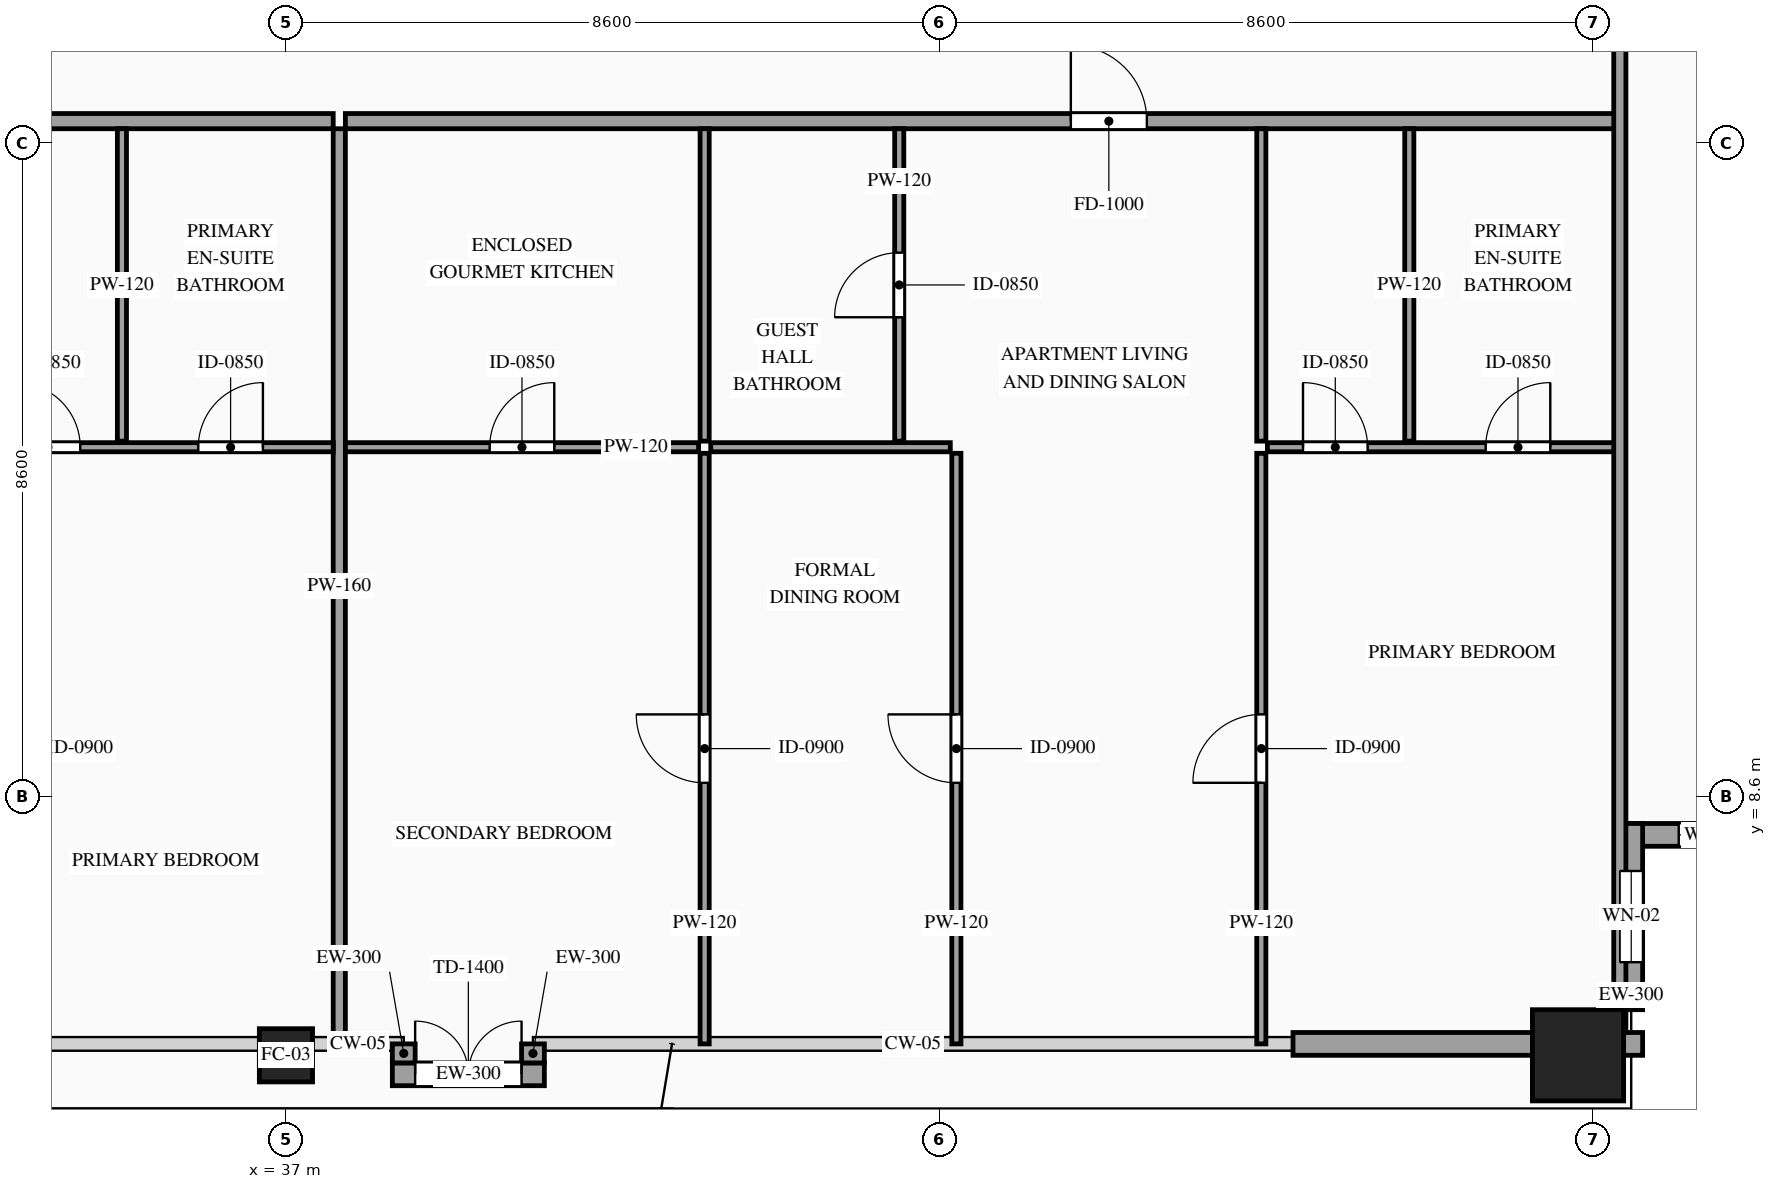
"""IFC4 building model, lengths in metres.
Left out: names, types, materials, properties, quantities, classifications, styles, units other than length and angle.
Written with IfcOpenShell. Run it as: python <this file> out.ifc"""

import sys

from ifc_helpers import new_model, si_unit, direction, frame, frame_2d, origin, origin_2d, place, context, subcontext, project, spatial, rectangle, hollow_rectangle, extrude, source, transform, mapped, element, fill, save


model = new_model("IFC4")
c1 = context("Model", 3, precision=1e-05, world=origin(), true_north=direction((0.0, 1.0)))
c2 = subcontext(c1, "Body", "Model", "MODEL_VIEW")
j1 = project(units=[si_unit("LENGTHUNIT", "METRE"), si_unit("PLANEANGLEUNIT", "RADIAN")], contexts=[c1])
p1 = place(None, origin())
s1 = spatial("IfcSite", under=j1, at=p1, CompositionType="ELEMENT")
p2 = place(p1, origin())
s2 = spatial("IfcBuilding", under=s1, at=p2, CompositionType="ELEMENT")
p3 = place(p2, frame((0.0, 0.0, 227.6)))
s3 = spatial("IfcBuildingStorey", under=s2, at=p3, CompositionType="ELEMENT", Elevation=227.6)
m1 = source(origin(), c2, "Body", "SweptSolid", [
    extrude(hollow_rectangle(XDim=0.7, YDim=0.7, WallThickness=0.032, at=origin_2d()), origin(), (0.0, 0.0, 1.0), 3.5),
])
p4 = place(p3, frame((37.0, 5.2, 0.0), z_axis=(0.0, 0.0, 1.0), x_axis=(1.0, 0.0, 0.0)))
e1 = element("IfcColumn", 1, at=p4, inside=s3, PredefinedType="COLUMN", context=c2, shape_type="MappedRepresentation", body=[
    mapped(m1, transform((0.0, 0.0, 0.0), scale=1.0)),
])
m2 = source(origin(), c2, "Body", "SweptSolid", [
    extrude(hollow_rectangle(XDim=1.2, YDim=1.2, WallThickness=0.055, at=origin_2d()), origin(), (0.0, 0.0, 1.0), 3.5),
])
p5 = place(p3, frame((54.0, 5.2, 0.0), z_axis=(0.0, 0.0, 1.0), x_axis=(1.0, 0.0, 0.0)))
e2 = element("IfcColumn", 2, at=p5, inside=s3, PredefinedType="COLUMN", context=c2, shape_type="MappedRepresentation", body=[
    mapped(m2, transform((0.0, 0.0, 0.0), scale=1.0)),
])
p6 = place(p3, frame((54.55, 8.1, 0.0), z_axis=(0.0, 0.0, 1.0), x_axis=(1.0, 0.0, 0.0)))
e3 = element("IfcWall", 3, at=p6, inside=s3, PredefinedType="SOLIDWALL", context=c2, shape_type="SweptSolid", body=[
    extrude(rectangle(XDim=2.45, YDim=0.3, at=frame_2d((1.225, 0.0))), origin(), (0.0, 0.0, 1.0), 3.28),
])
p7 = place(p6, frame((0.775, 0.0, 0.85)))
e4 = element("IfcOpeningElement", 4, at=p7, cuts=e3, PredefinedType="OPENING", context=c2, shape_type="SweptSolid", body=[
    extrude(rectangle(XDim=0.9, YDim=1.5, at=frame_2d((0.45, 0.75))), frame((0.0, 0.165, 0.0), z_axis=(0.0, -1.0, 0.0), x_axis=(1.0, 0.0, 0.0)), (0.0, 0.0, 1.0), 0.33),
])
p8 = place(p3, frame((54.7, 5.8, 0.0), z_axis=(0.0, 0.0, 1.0), x_axis=(0.0, 1.0, 0.0)))
e5 = element("IfcWall", 5, at=p8, inside=s3, PredefinedType="SOLIDWALL", context=c2, shape_type="SweptSolid", body=[
    extrude(rectangle(XDim=2.45, YDim=0.3, at=frame_2d((1.225, 0.0))), origin(), (0.0, 0.0, 1.0), 3.28),
])
p9 = place(p8, frame((0.625, 0.0, 0.85)))
e6 = element("IfcOpeningElement", 6, at=p9, cuts=e5, PredefinedType="OPENING", context=c2, shape_type="SweptSolid", body=[
    extrude(rectangle(XDim=1.2, YDim=2.1, at=frame_2d((0.6, 1.05))), frame((0.0, 0.165, 0.0), z_axis=(0.0, -1.0, 0.0), x_axis=(1.0, 0.0, 0.0)), (0.0, 0.0, 1.0), 0.33),
])
m3 = source(origin(), c2, "Body", "SweptSolid", [
    extrude(rectangle(XDim=0.25, YDim=0.3, at=frame_2d((0.125, 0.0))), origin(), (0.0, 0.0, 1.0), 3.28),
])
p10 = place(p3, frame((54.6, 5.35, 0.0), z_axis=(0.0, 0.0, 1.0), x_axis=(1.0, 0.0, 0.0)))
e7 = element("IfcWall", 7, at=p10, inside=s3, PredefinedType="SOLIDWALL", context=c2, shape_type="MappedRepresentation", body=[
    mapped(m3, transform((0.0, 0.0, 0.0), scale=1.0)),
])
m4 = source(origin(), c2, "Body", "SweptSolid", [
    extrude(rectangle(XDim=3.15, YDim=0.3, at=frame_2d((1.575, 0.0))), origin(), (0.0, 0.0, 1.0), 2.835),
])
p11 = place(p3, frame((50.25, 5.35, 0.0), z_axis=(0.0, 0.0, 1.0), x_axis=(1.0, 0.0, 0.0)))
e8 = element("IfcWall", 8, at=p11, inside=s3, PredefinedType="SOLIDWALL", context=c2, shape_type="MappedRepresentation", body=[
    mapped(m4, transform((0.0, 0.0, 0.0), scale=1.0)),
])
p12 = place(p3, frame((38.4, 4.95, 0.0), z_axis=(0.0, 0.0, 1.0), x_axis=(1.0, 0.0, 0.0)))
e9 = element("IfcWall", 9, at=p12, inside=s3, PredefinedType="SOLIDWALL", context=c2, shape_type="SweptSolid", body=[
    extrude(rectangle(XDim=2.0, YDim=0.3, at=frame_2d((1.0, 0.0))), origin(), (0.0, 0.0, 1.0), 2.835),
])
p13 = place(p12, frame((0.3, 0.0, 0.0)))
e10 = element("IfcOpeningElement", 10, at=p13, cuts=e9, PredefinedType="OPENING", context=c2, shape_type="SweptSolid", body=[
    extrude(rectangle(XDim=1.4, YDim=2.3, at=frame_2d((0.7, 1.15))), frame((0.0, 0.165, 0.0), z_axis=(0.0, -1.0, 0.0), x_axis=(1.0, 0.0, 0.0)), (0.0, 0.0, 1.0), 0.33),
])
for number, where, z_axis, x_axis in (
    (11, (38.55, 5.35, 0.0), (0.0, 0.0, 1.0), (0.0, -1.0, 0.0)),
    (12, (40.25, 5.1, 0.0), (0.0, 0.0, 1.0), (0.0, 1.0, 0.0)),
):
    element("IfcWall", number, at=place(p3, frame(where, z_axis=z_axis, x_axis=x_axis)), inside=s3, PredefinedType="SOLIDWALL", context=c2, shape_type="MappedRepresentation", body=[
        mapped(m3, transform((0.0, 0.0, 0.0), scale=1.0)),
    ])
p14 = place(p3, frame((19.44, 17.49, 0.0), z_axis=(0.0, 0.0, 1.0), x_axis=(1.0, 0.0, 0.0)))
e13 = element("IfcWall", 13, at=p14, inside=s3, PredefinedType="PARTITIONING", context=c2, shape_type="SweptSolid", body=[
    extrude(rectangle(XDim=18.182, YDim=0.2, at=frame_2d((9.091, 0.0))), origin(), (0.0, 0.0, 1.0), 3.28),
])
p15 = place(p14, frame((10.528, 0.0, 0.0)))
e14 = element("IfcOpeningElement", 14, at=p15, cuts=e13, PredefinedType="OPENING", context=c2, shape_type="SweptSolid", body=[
    extrude(rectangle(XDim=1.0, YDim=2.2, at=frame_2d((0.5, 1.1))), frame((0.0, 0.115, 0.0), z_axis=(0.0, -1.0, 0.0), x_axis=(1.0, 0.0, 0.0)), (0.0, 0.0, 1.0), 0.23),
])
m5 = source(origin(), c2, "Body", "SweptSolid", [
    extrude(rectangle(XDim=12.04, YDim=0.16, at=frame_2d((6.02, 0.0))), origin(), (0.0, 0.0, 1.0), 3.28),
])
p16 = place(p3, frame((37.702, 5.35, 0.0), z_axis=(0.0, 0.0, 1.0), x_axis=(0.0, 1.0, 0.0)))
e15 = element("IfcWall", 15, at=p16, inside=s3, PredefinedType="PARTITIONING", context=c2, shape_type="MappedRepresentation", body=[
    mapped(m5, transform((0.0, 0.0, 0.0), scale=1.0)),
])
m6 = source(origin(), c2, "Body", "SweptSolid", [
    extrude(rectangle(XDim=4.11, YDim=0.12, at=frame_2d((2.055, 0.0))), origin(), (0.0, 0.0, 1.0), 3.28),
])
p17 = place(p3, frame((34.842, 13.28, 0.0), z_axis=(0.0, 0.0, 1.0), x_axis=(0.0, 1.0, 0.0)))
e16 = element("IfcWall", 16, at=p17, inside=s3, PredefinedType="PARTITIONING", context=c2, shape_type="MappedRepresentation", body=[
    mapped(m6, transform((0.0, 0.0, 0.0), scale=1.0)),
])
p18 = place(p3, frame((32.975, 13.2, 0.0), z_axis=(0.0, 0.0, 1.0), x_axis=(1.0, 0.0, 0.0)))
e17 = element("IfcWall", 17, at=p18, inside=s3, PredefinedType="PARTITIONING", context=c2, shape_type="SweptSolid", body=[
    extrude(rectangle(XDim=4.647, YDim=0.12, at=frame_2d((2.323, 0.0))), origin(), (0.0, 0.0, 1.0), 3.28),
])
p19 = place(p18, frame((2.872, 0.0, 0.0)))
e18 = element("IfcOpeningElement", 18, at=p19, cuts=e17, PredefinedType="OPENING", context=c2, shape_type="SweptSolid", body=[
    extrude(rectangle(XDim=0.85, YDim=2.1, at=frame_2d((0.425, 1.05))), frame((0.0, 0.075, 0.0), z_axis=(0.0, -1.0, 0.0), x_axis=(1.0, 0.0, 0.0)), (0.0, 0.0, 1.0), 0.15),
])
p20 = place(p18, frame((0.469, 0.0, 0.0)))
e19 = element("IfcOpeningElement", 19, at=p20, cuts=e17, PredefinedType="OPENING", context=c2, shape_type="SweptSolid", body=[
    extrude(rectangle(XDim=0.85, YDim=2.1, at=frame_2d((0.425, 1.05))), frame((0.0, 0.075, 0.0), z_axis=(0.0, -1.0, 0.0), x_axis=(1.0, 0.0, 0.0)), (0.0, 0.0, 1.0), 0.15),
])
p21 = place(p3, frame((37.782, 17.49, 0.0), z_axis=(0.0, 0.0, 1.0), x_axis=(1.0, 0.0, 0.0)))
e20 = element("IfcWall", 20, at=p21, inside=s3, PredefinedType="PARTITIONING", context=c2, shape_type="SweptSolid", body=[
    extrude(rectangle(XDim=16.778, YDim=0.2, at=frame_2d((8.389, 0.0))), origin(), (0.0, 0.0, 1.0), 3.28),
])
p22 = place(p21, frame((9.545, 0.0, 0.0)))
e21 = element("IfcOpeningElement", 21, at=p22, cuts=e20, PredefinedType="OPENING", context=c2, shape_type="SweptSolid", body=[
    extrude(rectangle(XDim=1.0, YDim=2.2, at=frame_2d((0.5, 1.1))), frame((0.0, 0.115, 0.0), z_axis=(0.0, -1.0, 0.0), x_axis=(1.0, 0.0, 0.0)), (0.0, 0.0, 1.0), 0.23),
])
p23 = place(p3, frame((37.782, 13.2, 0.0), z_axis=(0.0, 0.0, 1.0), x_axis=(1.0, 0.0, 0.0)))
e22 = element("IfcWall", 22, at=p23, inside=s3, PredefinedType="PARTITIONING", context=c2, shape_type="SweptSolid", body=[
    extrude(rectangle(XDim=4.647, YDim=0.12, at=frame_2d((2.323, 0.0))), origin(), (0.0, 0.0, 1.0), 3.28),
])
p24 = place(p23, frame((1.898, 0.0, 0.0)))
e23 = element("IfcOpeningElement", 23, at=p24, cuts=e22, PredefinedType="OPENING", context=c2, shape_type="SweptSolid", body=[
    extrude(rectangle(XDim=0.85, YDim=2.1, at=frame_2d((0.425, 1.05))), frame((0.0, 0.075, 0.0), z_axis=(0.0, -1.0, 0.0), x_axis=(1.0, 0.0, 0.0)), (0.0, 0.0, 1.0), 0.15),
])
p25 = place(p3, frame((42.509, 13.28, 0.0), z_axis=(0.0, 0.0, 1.0), x_axis=(0.0, 1.0, 0.0)))
e24 = element("IfcWall", 24, at=p25, inside=s3, PredefinedType="PARTITIONING", context=c2, shape_type="MappedRepresentation", body=[
    mapped(m6, transform((0.0, 0.0, 0.0), scale=1.0)),
])
p26 = place(p3, frame((45.069, 13.28, 0.0), z_axis=(0.0, 0.0, 1.0), x_axis=(0.0, 1.0, 0.0)))
e25 = element("IfcWall", 25, at=p26, inside=s3, PredefinedType="PARTITIONING", context=c2, shape_type="SweptSolid", body=[
    extrude(rectangle(XDim=4.11, YDim=0.12, at=frame_2d((2.055, 0.0))), origin(), (0.0, 0.0, 1.0), 3.28),
])
p27 = place(p26, frame((1.63, 0.0, 0.0)))
e26 = element("IfcOpeningElement", 26, at=p27, cuts=e25, PredefinedType="OPENING", context=c2, shape_type="SweptSolid", body=[
    extrude(rectangle(XDim=0.85, YDim=2.1, at=frame_2d((0.425, 1.05))), frame((0.0, 0.075, 0.0), z_axis=(0.0, -1.0, 0.0), x_axis=(1.0, 0.0, 0.0)), (0.0, 0.0, 1.0), 0.15),
])
for number, where, z_axis, x_axis in (
    (27, (51.78, 13.28, 0.0), (0.0, 0.0, 1.0), (0.0, 1.0, 0.0)),
    (28, (49.833, 13.28, 0.0), (0.0, 0.0, 1.0), (0.0, 1.0, 0.0)),
):
    element("IfcWall", number, at=place(p3, frame(where, z_axis=z_axis, x_axis=x_axis)), inside=s3, PredefinedType="PARTITIONING", context=c2, shape_type="MappedRepresentation", body=[
        mapped(m6, transform((0.0, 0.0, 0.0), scale=1.0)),
    ])
p28 = place(p3, frame((42.509, 5.35, 0.0), z_axis=(0.0, 0.0, 1.0), x_axis=(0.0, 1.0, 0.0)))
e29 = element("IfcWall", 29, at=p28, inside=s3, PredefinedType="PARTITIONING", context=c2, shape_type="SweptSolid", body=[
    extrude(rectangle(XDim=7.77, YDim=0.12, at=frame_2d((3.885, 0.0))), origin(), (0.0, 0.0, 1.0), 3.28),
])
p29 = place(p28, frame((3.435, 0.0, 0.0)))
e30 = element("IfcOpeningElement", 30, at=p29, cuts=e29, PredefinedType="OPENING", context=c2, shape_type="SweptSolid", body=[
    extrude(rectangle(XDim=0.9, YDim=2.15, at=frame_2d((0.45, 1.075))), frame((0.0, 0.075, 0.0), z_axis=(0.0, -1.0, 0.0), x_axis=(1.0, 0.0, 0.0)), (0.0, 0.0, 1.0), 0.15),
])
p30 = place(p3, frame((49.913, 13.2, 0.0), z_axis=(0.0, 0.0, 1.0), x_axis=(1.0, 0.0, 0.0)))
e31 = element("IfcWall", 31, at=p30, inside=s3, PredefinedType="PARTITIONING", context=c2, shape_type="SweptSolid", body=[
    extrude(rectangle(XDim=4.647, YDim=0.12, at=frame_2d((2.323, 0.0))), origin(), (0.0, 0.0, 1.0), 3.28),
])
p31 = place(p30, frame((2.872, 0.0, 0.0)))
e32 = element("IfcOpeningElement", 32, at=p31, cuts=e31, PredefinedType="OPENING", context=c2, shape_type="SweptSolid", body=[
    extrude(rectangle(XDim=0.85, YDim=2.1, at=frame_2d((0.425, 1.05))), frame((0.0, 0.075, 0.0), z_axis=(0.0, -1.0, 0.0), x_axis=(1.0, 0.0, 0.0)), (0.0, 0.0, 1.0), 0.15),
])
p32 = place(p30, frame((0.469, 0.0, 0.0)))
e33 = element("IfcOpeningElement", 33, at=p32, cuts=e31, PredefinedType="OPENING", context=c2, shape_type="SweptSolid", body=[
    extrude(rectangle(XDim=0.85, YDim=2.1, at=frame_2d((0.425, 1.05))), frame((0.0, 0.075, 0.0), z_axis=(0.0, -1.0, 0.0), x_axis=(1.0, 0.0, 0.0)), (0.0, 0.0, 1.0), 0.15),
])
p33 = place(p3, frame((49.833, 5.35, 0.0), z_axis=(0.0, 0.0, 1.0), x_axis=(0.0, 1.0, 0.0)))
e34 = element("IfcWall", 34, at=p33, inside=s3, PredefinedType="PARTITIONING", context=c2, shape_type="SweptSolid", body=[
    extrude(rectangle(XDim=7.77, YDim=0.12, at=frame_2d((3.885, 0.0))), origin(), (0.0, 0.0, 1.0), 3.28),
])
p34 = place(p33, frame((3.435, 0.0, 0.0)))
e35 = element("IfcOpeningElement", 35, at=p34, cuts=e34, PredefinedType="OPENING", context=c2, shape_type="SweptSolid", body=[
    extrude(rectangle(XDim=0.9, YDim=2.15, at=frame_2d((0.45, 1.075))), frame((0.0, 0.075, 0.0), z_axis=(0.0, -1.0, 0.0), x_axis=(1.0, 0.0, 0.0)), (0.0, 0.0, 1.0), 0.15),
])
m7 = source(origin(), c2, "Body", "SweptSolid", [
    extrude(rectangle(XDim=3.152, YDim=0.12, at=frame_2d((1.576, 0.0))), origin(), (0.0, 0.0, 1.0), 3.28),
])
p35 = place(p3, frame((42.589, 13.2, 0.0), z_axis=(0.0, 0.0, 1.0), x_axis=(1.0, 0.0, 0.0)))
e36 = element("IfcWall", 36, at=p35, inside=s3, PredefinedType="PARTITIONING", context=c2, shape_type="MappedRepresentation", body=[
    mapped(m7, transform((0.0, 0.0, 0.0), scale=1.0)),
])
p36 = place(p3, frame((45.821, 5.35, 0.0), z_axis=(0.0, 0.0, 1.0), x_axis=(0.0, 1.0, 0.0)))
e37 = element("IfcWall", 37, at=p36, inside=s3, PredefinedType="PARTITIONING", context=c2, shape_type="SweptSolid", body=[
    extrude(rectangle(XDim=7.77, YDim=0.12, at=frame_2d((3.885, 0.0))), origin(), (0.0, 0.0, 1.0), 3.28),
])
p37 = place(p36, frame((3.435, 0.0, 0.0)))
e38 = element("IfcOpeningElement", 38, at=p37, cuts=e37, PredefinedType="OPENING", context=c2, shape_type="SweptSolid", body=[
    extrude(rectangle(XDim=0.9, YDim=2.15, at=frame_2d((0.45, 1.075))), frame((0.0, 0.075, 0.0), z_axis=(0.0, -1.0, 0.0), x_axis=(1.0, 0.0, 0.0)), (0.0, 0.0, 1.0), 0.15),
])
m8 = source(origin(), c2, "Body", "SweptSolid", [
    extrude(rectangle(XDim=26.69, YDim=0.16, at=frame_2d((13.345, 0.0))), origin(), (0.0, 0.0, 1.0), 3.28),
])
p38 = place(p3, frame((54.55, 5.5, 0.0), z_axis=(0.0, 0.0, 1.0), x_axis=(0.0, 1.0, 0.0)))
e39 = element("IfcWall", 39, at=p38, inside=s3, PredefinedType="PARTITIONING", context=c2, shape_type="MappedRepresentation", body=[
    mapped(m8, transform((0.0, 0.0, 0.0), scale=1.0)),
])
m9 = source(origin(), c2, "Body", "SweptSolid", [
    extrude(rectangle(XDim=0.9, YDim=1.5, at=frame_2d((0.45, 0.75))), frame((0.0, 0.03, 0.0), z_axis=(0.0, -1.0, 0.0), x_axis=(1.0, 0.0, 0.0)), (0.0, 0.0, 1.0), 0.06),
])
p39 = place(p7, origin())
e40 = element("IfcWindow", 40, at=p39, inside=s3, PartitioningType="SINGLE_PANEL", PredefinedType="WINDOW", context=c2, shape_type="MappedRepresentation", body=[
    mapped(m9, transform((0.0, 0.0, 0.0), scale=1.0)),
])
fill(e4, e40)
m10 = source(origin(), c2, "Body", "SweptSolid", [
    extrude(rectangle(XDim=1.2, YDim=2.1, at=frame_2d((0.6, 1.05))), frame((0.0, 0.03, 0.0), z_axis=(0.0, -1.0, 0.0), x_axis=(1.0, 0.0, 0.0)), (0.0, 0.0, 1.0), 0.06),
])
p40 = place(p9, origin())
e41 = element("IfcWindow", 41, at=p40, inside=s3, PartitioningType="SINGLE_PANEL", PredefinedType="WINDOW", context=c2, shape_type="MappedRepresentation", body=[
    mapped(m10, transform((0.0, 0.0, 0.0), scale=1.0)),
])
fill(e6, e41)
m11 = source(origin(), c2, "Body", "SweptSolid", [
    extrude(rectangle(XDim=1.4, YDim=2.3, at=frame_2d((0.7, 1.15))), frame((0.0, 0.025, 0.0), z_axis=(0.0, -1.0, 0.0), x_axis=(1.0, 0.0, 0.0)), (0.0, 0.0, 1.0), 0.05),
])
p41 = place(p13, origin())
e42 = element("IfcDoor", 42, at=p41, inside=s3, OperationType="DOUBLE_DOOR_SINGLE_SWING", PredefinedType="DOOR", context=c2, shape_type="MappedRepresentation", body=[
    mapped(m11, transform((0.0, 0.0, 0.0), scale=1.0)),
])
fill(e10, e42)
m12 = source(origin(), c2, "Body", "SweptSolid", [
    extrude(rectangle(XDim=0.85, YDim=2.1, at=frame_2d((0.425, 1.05))), frame((0.0, 0.025, 0.0), z_axis=(0.0, -1.0, 0.0), x_axis=(1.0, 0.0, 0.0)), (0.0, 0.0, 1.0), 0.05),
])
p42 = place(p19, origin())
e43 = element("IfcDoor", 43, at=p42, inside=s3, OperationType="SINGLE_SWING_RIGHT", PredefinedType="DOOR", context=c2, shape_type="MappedRepresentation", body=[
    mapped(m12, transform((0.0, 0.0, 0.0), scale=1.0)),
])
fill(e18, e43)
p43 = place(p20, origin())
e44 = element("IfcDoor", 44, at=p43, inside=s3, OperationType="SINGLE_SWING_LEFT", PredefinedType="DOOR", context=c2, shape_type="MappedRepresentation", body=[
    mapped(m12, transform((0.0, 0.0, 0.0), scale=1.0)),
])
fill(e19, e44)
m13 = source(origin(), c2, "Body", "SweptSolid", [
    extrude(rectangle(XDim=1.0, YDim=2.2, at=frame_2d((0.5, 1.1))), frame((0.0, 0.025, 0.0), z_axis=(0.0, -1.0, 0.0), x_axis=(1.0, 0.0, 0.0)), (0.0, 0.0, 1.0), 0.05),
])
p44 = place(p22, origin())
e45 = element("IfcDoor", 45, at=p44, inside=s3, OperationType="SINGLE_SWING_LEFT", PredefinedType="DOOR", context=c2, shape_type="MappedRepresentation", body=[
    mapped(m13, transform((0.0, 0.0, 0.0), scale=1.0)),
])
fill(e21, e45)
p45 = place(p24, origin())
e46 = element("IfcDoor", 46, at=p45, inside=s3, OperationType="SINGLE_SWING_RIGHT", PredefinedType="DOOR", context=c2, shape_type="MappedRepresentation", body=[
    mapped(m12, transform((0.0, 0.0, 0.0), scale=1.0)),
])
fill(e23, e46)
p46 = place(p27, origin())
e47 = element("IfcDoor", 47, at=p46, inside=s3, OperationType="SINGLE_SWING_LEFT", PredefinedType="DOOR", context=c2, shape_type="MappedRepresentation", body=[
    mapped(m12, transform((0.0, 0.0, 0.0), scale=1.0)),
])
fill(e26, e47)
p47 = place(p31, origin())
e48 = element("IfcDoor", 48, at=p47, inside=s3, OperationType="SINGLE_SWING_RIGHT", PredefinedType="DOOR", context=c2, shape_type="MappedRepresentation", body=[
    mapped(m12, transform((0.0, 0.0, 0.0), scale=1.0)),
])
fill(e32, e48)
p48 = place(p32, origin())
e49 = element("IfcDoor", 49, at=p48, inside=s3, OperationType="SINGLE_SWING_LEFT", PredefinedType="DOOR", context=c2, shape_type="MappedRepresentation", body=[
    mapped(m12, transform((0.0, 0.0, 0.0), scale=1.0)),
])
fill(e33, e49)
m14 = source(origin(), c2, "Body", "SweptSolid", [
    extrude(rectangle(XDim=0.9, YDim=2.15, at=frame_2d((0.45, 1.075))), frame((0.0, 0.025, 0.0), z_axis=(0.0, -1.0, 0.0), x_axis=(1.0, 0.0, 0.0)), (0.0, 0.0, 1.0), 0.05),
])
p49 = place(p29, origin())
e50 = element("IfcDoor", 50, at=p49, inside=s3, OperationType="SINGLE_SWING_RIGHT", PredefinedType="DOOR", context=c2, shape_type="MappedRepresentation", body=[
    mapped(m14, transform((0.0, 0.0, 0.0), scale=1.0)),
])
fill(e30, e50)
p50 = place(p34, origin())
e51 = element("IfcDoor", 51, at=p50, inside=s3, OperationType="SINGLE_SWING_LEFT", PredefinedType="DOOR", context=c2, shape_type="MappedRepresentation", body=[
    mapped(m14, transform((0.0, 0.0, 0.0), scale=1.0)),
])
fill(e35, e51)
p51 = place(p37, origin())
e52 = element("IfcDoor", 52, at=p51, inside=s3, OperationType="SINGLE_SWING_RIGHT", PredefinedType="DOOR", context=c2, shape_type="MappedRepresentation", body=[
    mapped(m14, transform((0.0, 0.0, 0.0), scale=1.0)),
])
fill(e38, e52)
save(model, sys.argv[1])
